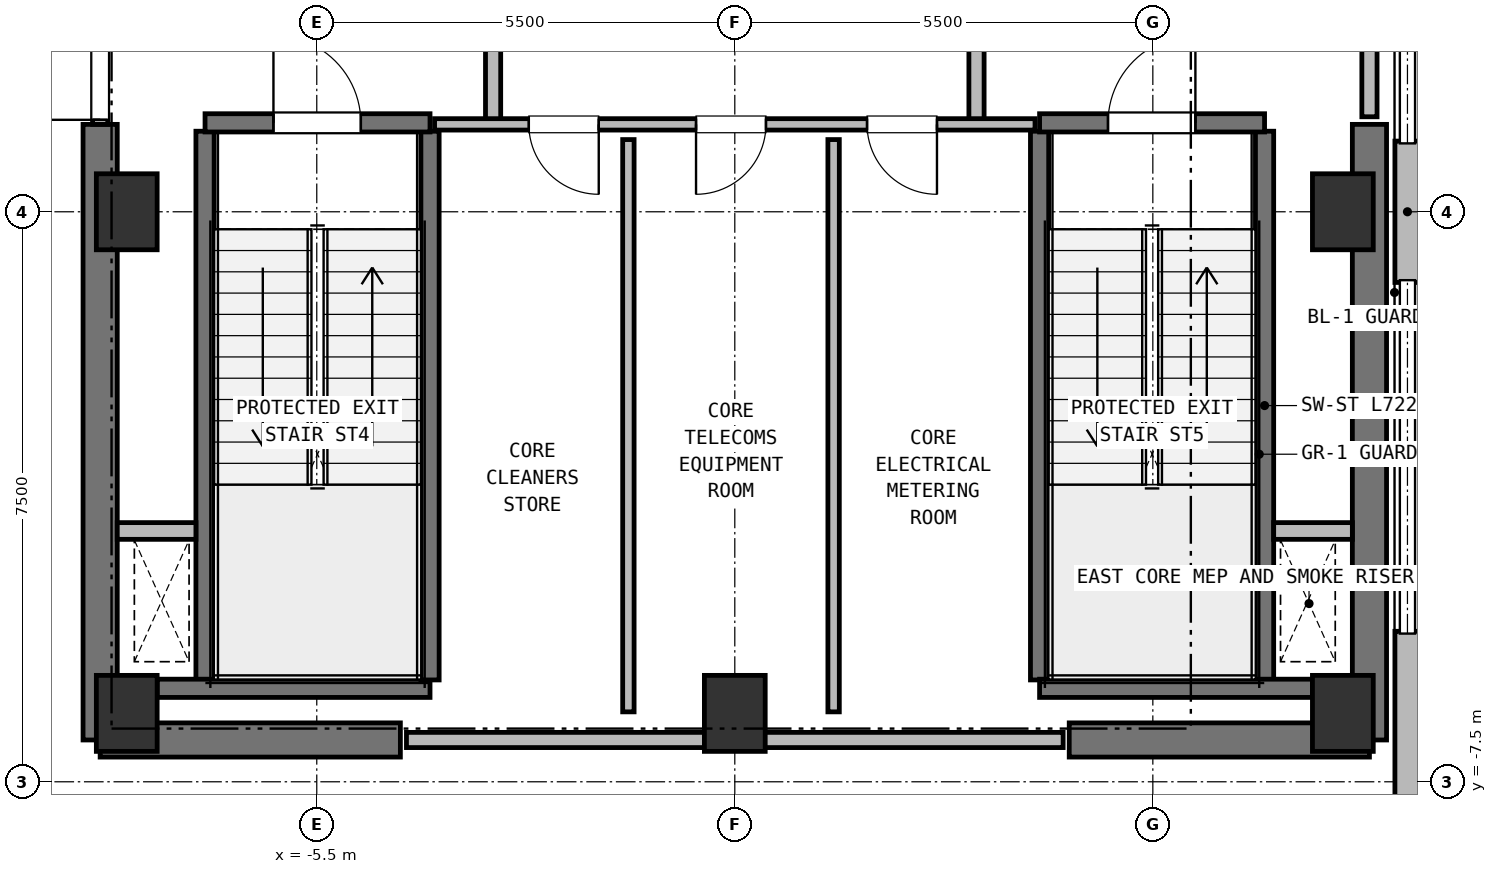
"""IFC4 building model, lengths in metres.
Left out: names, types, materials, properties, quantities, classifications, styles, units other than length and angle.
Written with IfcOpenShell. Run it as: python <this file> out.ifc"""

import sys

from ifc_helpers import new_model, si_unit, direction, frame, frame_2d, origin, origin_2d, place, context, subcontext, project, spatial, rectangle, extrude, element, fill, save


model = new_model("IFC4")
c1 = context("Model", 3, precision=1e-05, world=origin(), true_north=direction((0.0, 1.0)))
c2 = subcontext(c1, "Body", "Model", "MODEL_VIEW")
j1 = project(units=[si_unit("LENGTHUNIT", "METRE"), si_unit("PLANEANGLEUNIT", "RADIAN")], contexts=[c1])
p1 = place(None, origin())
s1 = spatial("IfcSite", under=j1, at=p1, CompositionType="ELEMENT")
p2 = place(p1, origin())
s2 = spatial("IfcBuilding", under=s1, at=p2, CompositionType="ELEMENT")
p3 = place(p2, frame((0.0, 0.0, 299.2)))
s3 = spatial("IfcBuildingStorey", under=s2, at=p3, CompositionType="ELEMENT", Elevation=299.2)
for number, where, z_axis, x_axis in (
    (1, (-8.0, -6.6, 0.0), (0.0, 0.0, 1.0), (1.0, 0.0, 0.0)),
    (2, (0.0, -6.6, 0.0), (0.0, 0.0, 1.0), (1.0, 0.0, 0.0)),
    (3, (8.0, -6.6, 0.0), (0.0, 0.0, 1.0), (1.0, 0.0, 0.0)),
    (4, (8.0, 0.0, 0.0), (0.0, 0.0, 1.0), (1.0, 0.0, 0.0)),
    (5, (-8.0, 0.0, 0.0), (0.0, 0.0, 1.0), (1.0, 0.0, 0.0)),
):
    element("IfcColumn", number, at=place(p3, frame(where, z_axis=z_axis, x_axis=x_axis)), inside=s3, PredefinedType="COLUMN", context=c2, shape_type="SweptSolid", body=[
        extrude(rectangle(XDim=0.8, YDim=1.0, at=origin_2d()), origin(), (0.0, 0.0, 1.0), 4.4),
    ])
for number, where, z_axis, x_axis in (
    (6, (-8.35, -6.95, 0.0), (0.0, 0.0, 1.0), (1.0, 0.0, 0.0)),
    (7, (4.4, -6.95, 0.0), (0.0, 0.0, 1.0), (1.0, 0.0, 0.0)),
):
    element("IfcWall", number, at=place(p3, frame(where, z_axis=z_axis, x_axis=x_axis)), inside=s3, PredefinedType="SHEAR", context=c2, shape_type="SweptSolid", body=[
        extrude(rectangle(XDim=3.95, YDim=0.45, at=frame_2d((1.975, 0.0))), origin(), (0.0, 0.0, 1.0), 4.12),
    ])
for number, where, z_axis, x_axis in (
    (8, (-8.35, -6.95, 0.0), (0.0, 0.0, 1.0), (0.0, 1.0, 0.0)),
    (9, (8.35, -6.95, 0.0), (0.0, 0.0, 1.0), (0.0, 1.0, 0.0)),
):
    element("IfcWall", number, at=place(p3, frame(where, z_axis=z_axis, x_axis=x_axis)), inside=s3, PredefinedType="SHEAR", context=c2, shape_type="SweptSolid", body=[
        extrude(rectangle(XDim=8.1, YDim=0.45, at=frame_2d((4.05, 0.0))), origin(), (0.0, 0.0, 1.0), 4.12),
    ])
p4 = place(p3, frame((8.85, -5.52, 0.0), z_axis=(0.0, 0.0, 1.0), x_axis=(0.0, -1.0, 0.0)))
e10 = element("IfcWall", 10, at=p4, inside=s3, PredefinedType="SOLIDWALL", context=c2, shape_type="SweptSolid", body=[
    extrude(rectangle(XDim=13.591, YDim=0.33, at=frame_2d((6.795, 0.0))), origin(), (0.0, 0.0, 1.0), 4.12),
])
p5 = place(p3, frame((8.85, 0.93, 0.0), z_axis=(0.0, 0.0, 1.0), x_axis=(0.0, -1.0, 0.0)))
e11 = element("IfcWall", 11, at=p5, inside=s3, PredefinedType="SOLIDWALL", context=c2, shape_type="SweptSolid", body=[
    extrude(rectangle(XDim=1.86, YDim=0.33, at=frame_2d((0.93, 0.0))), origin(), (0.0, 0.0, 1.0), 4.12),
])
p6 = place(p3, frame((-6.97, -6.16, 0.0), z_axis=(0.0, 0.0, 1.0), x_axis=(0.0, 1.0, 0.0)))
e12 = element("IfcWall", 12, at=p6, inside=s3, PredefinedType="SHEAR", context=c2, shape_type="SweptSolid", body=[
    extrude(rectangle(XDim=7.22, YDim=0.24, at=frame_2d((3.61, 0.0))), origin(), (0.0, 0.0, 1.0), 4.12),
])
p7 = place(p3, frame((-7.6, -6.27, 0.0), z_axis=(0.0, 0.0, 1.0), x_axis=(1.0, 0.0, 0.0)))
e13 = element("IfcWall", 13, at=p7, inside=s3, PredefinedType="SHEAR", context=c2, shape_type="SweptSolid", body=[
    extrude(rectangle(XDim=3.59, YDim=0.24, at=frame_2d((1.795, 0.0))), origin(), (0.0, 0.0, 1.0), 4.12),
])
p8 = place(p3, frame((-4.01, -6.16, 0.0), z_axis=(0.0, 0.0, 1.0), x_axis=(0.0, 1.0, 0.0)))
e14 = element("IfcWall", 14, at=p8, inside=s3, PredefinedType="SHEAR", context=c2, shape_type="SweptSolid", body=[
    extrude(rectangle(XDim=7.22, YDim=0.24, at=frame_2d((3.61, 0.0))), origin(), (0.0, 0.0, 1.0), 4.12),
])
p9 = place(p3, frame((-6.97, 1.17, 0.0), z_axis=(0.0, 0.0, 1.0), x_axis=(1.0, 0.0, 0.0)))
e15 = element("IfcWall", 15, at=p9, inside=s3, PredefinedType="SHEAR", context=c2, shape_type="SweptSolid", body=[
    extrude(rectangle(XDim=2.96, YDim=0.24, at=frame_2d((1.48, 0.0))), origin(), (0.0, 0.0, 1.0), 4.12),
])
p10 = place(p9, frame((0.9, 0.0, 0.0)))
e16 = element("IfcOpeningElement", 16, at=p10, cuts=e15, PredefinedType="OPENING", context=c2, shape_type="SweptSolid", body=[
    extrude(rectangle(XDim=1.15, YDim=2.15, at=frame_2d((0.575, 1.075))), frame((0.0, 0.13, 0.0), z_axis=(0.0, -1.0, 0.0), x_axis=(1.0, 0.0, 0.0)), (0.0, 0.0, 1.0), 0.26),
])
for number, where, z_axis, x_axis in (
    (17, (4.01, -6.16, 0.0), (0.0, 0.0, 1.0), (0.0, 1.0, 0.0)),
    (18, (6.97, -6.16, 0.0), (0.0, 0.0, 1.0), (0.0, 1.0, 0.0)),
):
    element("IfcWall", number, at=place(p3, frame(where, z_axis=z_axis, x_axis=x_axis)), inside=s3, PredefinedType="SHEAR", context=c2, shape_type="SweptSolid", body=[
        extrude(rectangle(XDim=7.22, YDim=0.24, at=frame_2d((3.61, 0.0))), origin(), (0.0, 0.0, 1.0), 4.12),
    ])
p11 = place(p3, frame((4.01, -6.27, 0.0), z_axis=(0.0, 0.0, 1.0), x_axis=(1.0, 0.0, 0.0)))
e19 = element("IfcWall", 19, at=p11, inside=s3, PredefinedType="SHEAR", context=c2, shape_type="SweptSolid", body=[
    extrude(rectangle(XDim=3.59, YDim=0.24, at=frame_2d((1.795, 0.0))), origin(), (0.0, 0.0, 1.0), 4.12),
])
p12 = place(p3, frame((4.01, 1.17, 0.0), z_axis=(0.0, 0.0, 1.0), x_axis=(1.0, 0.0, 0.0)))
e20 = element("IfcWall", 20, at=p12, inside=s3, PredefinedType="SHEAR", context=c2, shape_type="SweptSolid", body=[
    extrude(rectangle(XDim=2.96, YDim=0.24, at=frame_2d((1.48, 0.0))), origin(), (0.0, 0.0, 1.0), 4.12),
])
p13 = place(p12, frame((0.9, 0.0, 0.0)))
e21 = element("IfcOpeningElement", 21, at=p13, cuts=e20, PredefinedType="OPENING", context=c2, shape_type="SweptSolid", body=[
    extrude(rectangle(XDim=1.15, YDim=2.15, at=frame_2d((0.575, 1.075))), frame((0.0, 0.13, 0.0), z_axis=(0.0, -1.0, 0.0), x_axis=(1.0, 0.0, 0.0)), (0.0, 0.0, 1.0), 0.26),
])
for number, where, z_axis, x_axis in (
    (22, (-8.125, -4.2, 0.0), (0.0, 0.0, 1.0), (1.0, 0.0, 0.0)),
    (23, (7.09, -4.2, 0.0), (0.0, 0.0, 1.0), (1.0, 0.0, 0.0)),
):
    element("IfcWall", number, at=place(p3, frame(where, z_axis=z_axis, x_axis=x_axis)), inside=s3, PredefinedType="PARTITIONING", context=c2, shape_type="SweptSolid", body=[
        extrude(rectangle(XDim=1.035, YDim=0.22, at=frame_2d((0.518, 0.0))), origin(), (0.0, 0.0, 1.0), 4.12),
    ])
p14 = place(p3, frame((-3.18, 1.15, 0.0), z_axis=(0.0, 0.0, 1.0), x_axis=(0.0, 1.0, 0.0)))
e24 = element("IfcWall", 24, at=p14, inside=s3, PredefinedType="PARTITIONING", context=c2, shape_type="SweptSolid", body=[
    extrude(rectangle(XDim=3.3, YDim=0.2, at=frame_2d((1.65, 0.0))), origin(), (0.0, 0.0, 1.0), 4.12),
])
p15 = place(p14, frame((1.08, 0.0, 0.0)))
e25 = element("IfcOpeningElement", 25, at=p15, cuts=e24, PredefinedType="OPENING", context=c2, shape_type="SweptSolid", body=[
    extrude(rectangle(XDim=1.15, YDim=2.15, at=frame_2d((0.575, 1.075))), frame((0.0, 0.11, 0.0), z_axis=(0.0, -1.0, 0.0), x_axis=(1.0, 0.0, 0.0)), (0.0, 0.0, 1.0), 0.22),
])
p16 = place(p3, frame((3.18, 1.15, 0.0), z_axis=(0.0, 0.0, 1.0), x_axis=(0.0, 1.0, 0.0)))
e26 = element("IfcWall", 26, at=p16, inside=s3, PredefinedType="PARTITIONING", context=c2, shape_type="SweptSolid", body=[
    extrude(rectangle(XDim=3.3, YDim=0.2, at=frame_2d((1.65, 0.0))), origin(), (0.0, 0.0, 1.0), 4.12),
])
p17 = place(p16, frame((1.08, 0.0, 0.0)))
e27 = element("IfcOpeningElement", 27, at=p17, cuts=e26, PredefinedType="OPENING", context=c2, shape_type="SweptSolid", body=[
    extrude(rectangle(XDim=1.15, YDim=2.15, at=frame_2d((0.575, 1.075))), frame((0.0, 0.11, 0.0), z_axis=(0.0, -1.0, 0.0), x_axis=(1.0, 0.0, 0.0)), (0.0, 0.0, 1.0), 0.22),
])
p18 = place(p3, frame((-8.35, 1.15, 0.0), z_axis=(0.0, 0.0, 1.0), x_axis=(0.0, 1.0, 0.0)))
e28 = element("IfcWall", 28, at=p18, inside=s3, PredefinedType="PARTITIONING", context=c2, shape_type="SweptSolid", body=[
    extrude(rectangle(XDim=5.4, YDim=0.2, at=frame_2d((2.7, 0.0))), origin(), (0.0, 0.0, 1.0), 4.12),
])
p19 = place(p18, frame((0.06, 0.0, 0.0)))
e29 = element("IfcOpeningElement", 29, at=p19, cuts=e28, PredefinedType="OPENING", context=c2, shape_type="SweptSolid", body=[
    extrude(rectangle(XDim=1.15, YDim=2.15, at=frame_2d((0.575, 1.075))), frame((0.0, 0.11, 0.0), z_axis=(0.0, -1.0, 0.0), x_axis=(1.0, 0.0, 0.0)), (0.0, 0.0, 1.0), 0.22),
])
p20 = place(p3, frame((8.35, 1.25, 0.0), z_axis=(0.0, 0.0, 1.0), x_axis=(0.0, 1.0, 0.0)))
e30 = element("IfcWall", 30, at=p20, inside=s3, PredefinedType="PARTITIONING", context=c2, shape_type="SweptSolid", body=[
    extrude(rectangle(XDim=5.3, YDim=0.2, at=frame_2d((2.65, 0.0))), origin(), (0.0, 0.0, 1.0), 4.12),
])
p21 = place(p3, frame((3.95, 1.15, 0.0), z_axis=(0.0, 0.0, 1.0), x_axis=(-1.0, 0.0, 0.0)))
e31 = element("IfcWall", 31, at=p21, inside=s3, PredefinedType="PARTITIONING", context=c2, shape_type="SweptSolid", body=[
    extrude(rectangle(XDim=7.9, YDim=0.15, at=frame_2d((3.95, 0.0))), origin(), (0.0, 0.0, 1.0), 4.12),
])
p22 = place(p21, frame((5.74, 0.0, 0.0)))
e32 = element("IfcOpeningElement", 32, at=p22, cuts=e31, PredefinedType="OPENING", context=c2, shape_type="SweptSolid", body=[
    extrude(rectangle(XDim=0.92, YDim=2.05, at=frame_2d((0.46, 1.025))), frame((0.0, 0.085, 0.0), z_axis=(0.0, -1.0, 0.0), x_axis=(1.0, 0.0, 0.0)), (0.0, 0.0, 1.0), 0.17),
])
p23 = place(p21, frame((3.54, 0.0, 0.0)))
e33 = element("IfcOpeningElement", 33, at=p23, cuts=e31, PredefinedType="OPENING", context=c2, shape_type="SweptSolid", body=[
    extrude(rectangle(XDim=0.92, YDim=2.05, at=frame_2d((0.46, 1.025))), frame((0.0, 0.085, 0.0), z_axis=(0.0, -1.0, 0.0), x_axis=(1.0, 0.0, 0.0)), (0.0, 0.0, 1.0), 0.17),
])
p24 = place(p21, frame((1.29, 0.0, 0.0)))
e34 = element("IfcOpeningElement", 34, at=p24, cuts=e31, PredefinedType="OPENING", context=c2, shape_type="SweptSolid", body=[
    extrude(rectangle(XDim=0.92, YDim=2.05, at=frame_2d((0.46, 1.025))), frame((0.0, 0.085, 0.0), z_axis=(0.0, -1.0, 0.0), x_axis=(1.0, 0.0, 0.0)), (0.0, 0.0, 1.0), 0.17),
])
p25 = place(p3, frame((-4.32, -6.95, 0.0), z_axis=(0.0, 0.0, 1.0), x_axis=(1.0, 0.0, 0.0)))
e35 = element("IfcWall", 35, at=p25, inside=s3, PredefinedType="PARTITIONING", context=c2, shape_type="SweptSolid", body=[
    extrude(rectangle(XDim=8.64, YDim=0.2, at=frame_2d((4.32, 0.0))), origin(), (0.0, 0.0, 1.0), 4.12),
])
for number, where, z_axis, x_axis in (
    (36, (-1.4, -6.58, 0.0), (0.0, 0.0, 1.0), (0.0, 1.0, 0.0)),
    (37, (1.3, -6.58, 0.0), (0.0, 0.0, 1.0), (0.0, 1.0, 0.0)),
):
    element("IfcWall", number, at=place(p3, frame(where, z_axis=z_axis, x_axis=x_axis)), inside=s3, PredefinedType="PARTITIONING", context=c2, shape_type="SweptSolid", body=[
        extrude(rectangle(XDim=7.53, YDim=0.15, at=frame_2d((3.765, 0.0))), origin(), (0.0, 0.0, 1.0), 4.12),
    ])
p26 = place(p10, origin())
e38 = element("IfcDoor", 38, at=p26, inside=s3, OperationType="SINGLE_SWING_LEFT", PredefinedType="DOOR", context=c2, shape_type="SweptSolid", body=[
    extrude(rectangle(XDim=1.15, YDim=2.15, at=frame_2d((0.575, 1.075))), frame((0.0, 0.025, 0.0), z_axis=(0.0, -1.0, 0.0), x_axis=(1.0, 0.0, 0.0)), (0.0, 0.0, 1.0), 0.05),
])
fill(e16, e38)
p27 = place(p13, origin())
e39 = element("IfcDoor", 39, at=p27, inside=s3, OperationType="SINGLE_SWING_RIGHT", PredefinedType="DOOR", context=c2, shape_type="SweptSolid", body=[
    extrude(rectangle(XDim=1.15, YDim=2.15, at=frame_2d((0.575, 1.075))), frame((0.0, 0.025, 0.0), z_axis=(0.0, -1.0, 0.0), x_axis=(1.0, 0.0, 0.0)), (0.0, 0.0, 1.0), 0.05),
])
fill(e21, e39)
p28 = place(p19, origin())
e40 = element("IfcDoor", 40, at=p28, inside=s3, OperationType="SINGLE_SWING_LEFT", PredefinedType="DOOR", context=c2, shape_type="SweptSolid", body=[
    extrude(rectangle(XDim=1.15, YDim=2.15, at=frame_2d((0.575, 1.075))), frame((0.0, 0.025, 0.0), z_axis=(0.0, -1.0, 0.0), x_axis=(1.0, 0.0, 0.0)), (0.0, 0.0, 1.0), 0.05),
])
fill(e29, e40)
p29 = place(p22, origin())
e41 = element("IfcDoor", 41, at=p29, inside=s3, OperationType="SINGLE_SWING_LEFT", PredefinedType="DOOR", context=c2, shape_type="SweptSolid", body=[
    extrude(rectangle(XDim=0.92, YDim=2.05, at=frame_2d((0.46, 1.025))), frame((0.0, 0.025, 0.0), z_axis=(0.0, -1.0, 0.0), x_axis=(1.0, 0.0, 0.0)), (0.0, 0.0, 1.0), 0.05),
])
fill(e32, e41)
p30 = place(p23, origin())
e42 = element("IfcDoor", 42, at=p30, inside=s3, OperationType="SINGLE_SWING_RIGHT", PredefinedType="DOOR", context=c2, shape_type="SweptSolid", body=[
    extrude(rectangle(XDim=0.92, YDim=2.05, at=frame_2d((0.46, 1.025))), frame((0.0, 0.025, 0.0), z_axis=(0.0, -1.0, 0.0), x_axis=(1.0, 0.0, 0.0)), (0.0, 0.0, 1.0), 0.05),
])
fill(e33, e42)
p31 = place(p24, origin())
e43 = element("IfcDoor", 43, at=p31, inside=s3, OperationType="SINGLE_SWING_LEFT", PredefinedType="DOOR", context=c2, shape_type="SweptSolid", body=[
    extrude(rectangle(XDim=0.92, YDim=2.05, at=frame_2d((0.46, 1.025))), frame((0.0, 0.025, 0.0), z_axis=(0.0, -1.0, 0.0), x_axis=(1.0, 0.0, 0.0)), (0.0, 0.0, 1.0), 0.05),
])
fill(e34, e43)
save(model, sys.argv[1])
